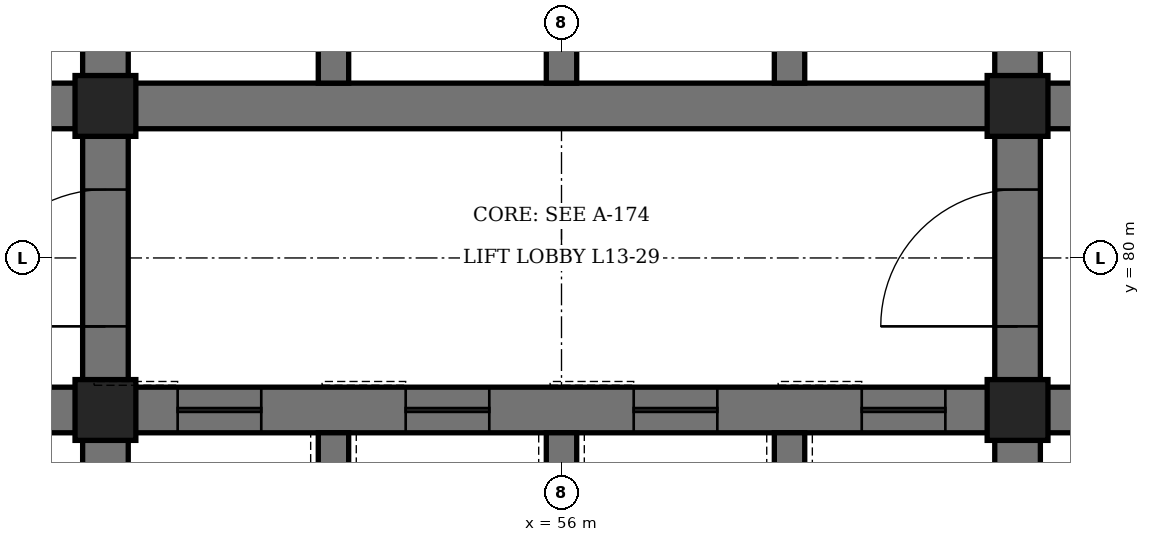
"""IFC4 building model, lengths in metres.
Left out: names, types, materials, properties, quantities, classifications, styles, units other than length and angle.
Written with IfcOpenShell. Run it as: python <this file> out.ifc"""

import sys

from ifc_helpers import new_model, si_unit, direction, frame, frame_2d, origin, origin_2d, place, context, subcontext, project, spatial, rectangle, hollow_rectangle, extrude, element, fill, save


model = new_model("IFC4")
c1 = context("Model", 3, precision=1e-05, world=origin(), true_north=direction((0.0, 1.0)))
c2 = subcontext(c1, "Body", "Model", "MODEL_VIEW")
j1 = project(units=[si_unit("LENGTHUNIT", "METRE"), si_unit("PLANEANGLEUNIT", "RADIAN")], contexts=[c1])
p1 = place(None, origin())
s1 = spatial("IfcSite", under=j1, at=p1, CompositionType="ELEMENT")
p2 = place(p1, origin())
s2 = spatial("IfcBuilding", under=s1, at=p2, CompositionType="ELEMENT")
p3 = place(p2, frame((0.0, 0.0, 64.3)))
s3 = spatial("IfcBuildingStorey", under=s2, at=p3, CompositionType="ELEMENT", Elevation=64.3)
p4 = place(p3, frame((50.0, 71.6, 0.0), z_axis=(0.0, 0.0, 1.0), x_axis=(0.0, 1.0, 0.0)))
e1 = element("IfcWall", 1, at=p4, inside=s3, PredefinedType="SHEAR", context=c2, shape_type="SweptSolid", body=[
    extrude(rectangle(XDim=16.8, YDim=0.6, at=frame_2d((8.4, 0.0))), origin(), (0.0, 0.0, 1.0), 4.2),
])
p5 = place(p4, frame((7.5, 0.0, 0.0)))
e2 = element("IfcOpeningElement", 2, at=p5, cuts=e1, PredefinedType="OPENING", context=c2, shape_type="SweptSolid", body=[
    extrude(rectangle(XDim=1.8, YDim=2.4, at=frame_2d((0.9, 1.2))), frame((0.0, 0.31, 0.0), z_axis=(0.0, -1.0, 0.0), x_axis=(1.0, 0.0, 0.0)), (0.0, 0.0, 1.0), 0.62),
])
p6 = place(p3, frame((62.0, 71.6, 0.0), z_axis=(0.0, 0.0, 1.0), x_axis=(0.0, 1.0, 0.0)))
e3 = element("IfcWall", 3, at=p6, inside=s3, PredefinedType="SHEAR", context=c2, shape_type="SweptSolid", body=[
    extrude(rectangle(XDim=16.8, YDim=0.6, at=frame_2d((8.4, 0.0))), origin(), (0.0, 0.0, 1.0), 4.2),
])
p7 = place(p6, frame((7.5, 0.0, 0.0)))
e4 = element("IfcOpeningElement", 4, at=p7, cuts=e3, PredefinedType="OPENING", context=c2, shape_type="SweptSolid", body=[
    extrude(rectangle(XDim=1.8, YDim=2.4, at=frame_2d((0.9, 1.2))), frame((0.0, 0.31, 0.0), z_axis=(0.0, -1.0, 0.0), x_axis=(1.0, 0.0, 0.0)), (0.0, 0.0, 1.0), 0.62),
])
p8 = place(p3, frame((44.6, 78.0, 0.0), z_axis=(0.0, 0.0, 1.0), x_axis=(1.0, 0.0, 0.0)))
e5 = element("IfcWall", 5, at=p8, inside=s3, PredefinedType="SHEAR", context=c2, shape_type="SweptSolid", body=[
    extrude(rectangle(XDim=5.1, YDim=0.6, at=frame_2d((2.55, 0.0))), origin(), (0.0, 0.0, 1.0), 4.2),
])
p9 = place(p8, frame((1.8, 0.0, 0.0)))
e6 = element("IfcOpeningElement", 6, at=p9, cuts=e5, PredefinedType="OPENING", context=c2, shape_type="SweptSolid", body=[
    extrude(rectangle(XDim=1.2, YDim=2.1, at=frame_2d((0.6, 1.05))), frame((0.0, 0.31, 0.0), z_axis=(0.0, -1.0, 0.0), x_axis=(1.0, 0.0, 0.0)), (0.0, 0.0, 1.0), 0.62),
])
p10 = place(p3, frame((44.6, 82.0, 0.0), z_axis=(0.0, 0.0, 1.0), x_axis=(1.0, 0.0, 0.0)))
e7 = element("IfcWall", 7, at=p10, inside=s3, PredefinedType="SHEAR", context=c2, shape_type="SweptSolid", body=[
    extrude(rectangle(XDim=5.1, YDim=0.6, at=frame_2d((2.55, 0.0))), origin(), (0.0, 0.0, 1.0), 4.2),
])
p11 = place(p10, frame((0.7, 0.0, 0.0)))
e8 = element("IfcOpeningElement", 8, at=p11, cuts=e7, PredefinedType="OPENING", context=c2, shape_type="SweptSolid", body=[
    extrude(rectangle(XDim=0.9, YDim=2.1, at=frame_2d((0.45, 1.05))), frame((0.0, 0.31, 0.0), z_axis=(0.0, -1.0, 0.0), x_axis=(1.0, 0.0, 0.0)), (0.0, 0.0, 1.0), 0.62),
])
p12 = place(p3, frame((62.3, 78.0, 0.0), z_axis=(0.0, 0.0, 1.0), x_axis=(1.0, 0.0, 0.0)))
e9 = element("IfcWall", 9, at=p12, inside=s3, PredefinedType="SHEAR", context=c2, shape_type="SweptSolid", body=[
    extrude(rectangle(XDim=5.1, YDim=0.6, at=frame_2d((2.55, 0.0))), origin(), (0.0, 0.0, 1.0), 4.2),
])
p13 = place(p12, frame((2.1, 0.0, 0.0)))
e10 = element("IfcOpeningElement", 10, at=p13, cuts=e9, PredefinedType="OPENING", context=c2, shape_type="SweptSolid", body=[
    extrude(rectangle(XDim=1.2, YDim=2.1, at=frame_2d((0.6, 1.05))), frame((0.0, 0.31, 0.0), z_axis=(0.0, -1.0, 0.0), x_axis=(1.0, 0.0, 0.0)), (0.0, 0.0, 1.0), 0.62),
])
p14 = place(p3, frame((62.3, 82.0, 0.0), z_axis=(0.0, 0.0, 1.0), x_axis=(1.0, 0.0, 0.0)))
e11 = element("IfcWall", 11, at=p14, inside=s3, PredefinedType="SHEAR", context=c2, shape_type="SweptSolid", body=[
    extrude(rectangle(XDim=5.1, YDim=0.6, at=frame_2d((2.55, 0.0))), origin(), (0.0, 0.0, 1.0), 4.2),
])
p15 = place(p14, frame((2.1, 0.0, 0.0)))
e12 = element("IfcOpeningElement", 12, at=p15, cuts=e11, PredefinedType="OPENING", context=c2, shape_type="SweptSolid", body=[
    extrude(rectangle(XDim=1.2, YDim=2.1, at=frame_2d((0.6, 1.05))), frame((0.0, 0.31, 0.0), z_axis=(0.0, -1.0, 0.0), x_axis=(1.0, 0.0, 0.0)), (0.0, 0.0, 1.0), 0.62),
])
p16 = place(p3, frame((50.3, 78.0, 0.0), z_axis=(0.0, 0.0, 1.0), x_axis=(1.0, 0.0, 0.0)))
e13 = element("IfcWall", 13, at=p16, inside=s3, PredefinedType="SHEAR", context=c2, shape_type="SweptSolid", body=[
    extrude(rectangle(XDim=11.4, YDim=0.6, at=frame_2d((5.7, 0.0))), origin(), (0.0, 0.0, 1.0), 4.2),
])
p17 = place(p16, frame((0.65, 0.0, 0.0)))
e14 = element("IfcOpeningElement", 14, at=p17, cuts=e13, PredefinedType="OPENING", context=c2, shape_type="SweptSolid", body=[
    extrude(rectangle(XDim=1.1, YDim=2.2, at=frame_2d((0.55, 1.1))), frame((0.0, 0.31, 0.0), z_axis=(0.0, -1.0, 0.0), x_axis=(1.0, 0.0, 0.0)), (0.0, 0.0, 1.0), 0.62),
])
p18 = place(p16, frame((3.65, 0.0, 0.0)))
e15 = element("IfcOpeningElement", 15, at=p18, cuts=e13, PredefinedType="OPENING", context=c2, shape_type="SweptSolid", body=[
    extrude(rectangle(XDim=1.1, YDim=2.2, at=frame_2d((0.55, 1.1))), frame((0.0, 0.31, 0.0), z_axis=(0.0, -1.0, 0.0), x_axis=(1.0, 0.0, 0.0)), (0.0, 0.0, 1.0), 0.62),
])
p19 = place(p16, frame((6.65, 0.0, 0.0)))
e16 = element("IfcOpeningElement", 16, at=p19, cuts=e13, PredefinedType="OPENING", context=c2, shape_type="SweptSolid", body=[
    extrude(rectangle(XDim=1.1, YDim=2.2, at=frame_2d((0.55, 1.1))), frame((0.0, 0.31, 0.0), z_axis=(0.0, -1.0, 0.0), x_axis=(1.0, 0.0, 0.0)), (0.0, 0.0, 1.0), 0.62),
])
p20 = place(p16, frame((9.65, 0.0, 0.0)))
e17 = element("IfcOpeningElement", 17, at=p20, cuts=e13, PredefinedType="OPENING", context=c2, shape_type="SweptSolid", body=[
    extrude(rectangle(XDim=1.1, YDim=2.2, at=frame_2d((0.55, 1.1))), frame((0.0, 0.31, 0.0), z_axis=(0.0, -1.0, 0.0), x_axis=(1.0, 0.0, 0.0)), (0.0, 0.0, 1.0), 0.62),
])
p21 = place(p3, frame((50.3, 82.0, 0.0), z_axis=(0.0, 0.0, 1.0), x_axis=(1.0, 0.0, 0.0)))
e18 = element("IfcWall", 18, at=p21, inside=s3, PredefinedType="SHEAR", context=c2, shape_type="SweptSolid", body=[
    extrude(rectangle(XDim=11.4, YDim=0.6, at=frame_2d((5.7, 0.0))), origin(), (0.0, 0.0, 1.0), 4.2),
])
p22 = place(p3, frame((53.0, 74.2, 0.0), z_axis=(0.0, 0.0, 1.0), x_axis=(0.0, 1.0, 0.0)))
e19 = element("IfcWall", 19, at=p22, inside=s3, PredefinedType="SHEAR", context=c2, shape_type="SweptSolid", body=[
    extrude(rectangle(XDim=3.5, YDim=0.4, at=frame_2d((1.75, 0.0))), origin(), (0.0, 0.0, 1.0), 4.2),
])
p23 = place(p3, frame((53.0, 82.3, 0.0), z_axis=(0.0, 0.0, 1.0), x_axis=(0.0, 1.0, 0.0)))
e20 = element("IfcWall", 20, at=p23, inside=s3, PredefinedType="SHEAR", context=c2, shape_type="SweptSolid", body=[
    extrude(rectangle(XDim=3.4, YDim=0.4, at=frame_2d((1.7, 0.0))), origin(), (0.0, 0.0, 1.0), 4.2),
])
p24 = place(p3, frame((56.0, 74.2, 0.0), z_axis=(0.0, 0.0, 1.0), x_axis=(0.0, 1.0, 0.0)))
e21 = element("IfcWall", 21, at=p24, inside=s3, PredefinedType="SHEAR", context=c2, shape_type="SweptSolid", body=[
    extrude(rectangle(XDim=3.5, YDim=0.4, at=frame_2d((1.75, 0.0))), origin(), (0.0, 0.0, 1.0), 4.2),
])
p25 = place(p3, frame((56.0, 82.3, 0.0), z_axis=(0.0, 0.0, 1.0), x_axis=(0.0, 1.0, 0.0)))
e22 = element("IfcWall", 22, at=p25, inside=s3, PredefinedType="SHEAR", context=c2, shape_type="SweptSolid", body=[
    extrude(rectangle(XDim=3.4, YDim=0.4, at=frame_2d((1.7, 0.0))), origin(), (0.0, 0.0, 1.0), 4.2),
])
p26 = place(p3, frame((59.0, 74.2, 0.0), z_axis=(0.0, 0.0, 1.0), x_axis=(0.0, 1.0, 0.0)))
e23 = element("IfcWall", 23, at=p26, inside=s3, PredefinedType="SHEAR", context=c2, shape_type="SweptSolid", body=[
    extrude(rectangle(XDim=3.5, YDim=0.4, at=frame_2d((1.75, 0.0))), origin(), (0.0, 0.0, 1.0), 4.2),
])
p27 = place(p3, frame((59.0, 82.3, 0.0), z_axis=(0.0, 0.0, 1.0), x_axis=(0.0, 1.0, 0.0)))
e24 = element("IfcWall", 24, at=p27, inside=s3, PredefinedType="SHEAR", context=c2, shape_type="SweptSolid", body=[
    extrude(rectangle(XDim=3.4, YDim=0.4, at=frame_2d((1.7, 0.0))), origin(), (0.0, 0.0, 1.0), 4.2),
])
for number, where, z_axis, x_axis in (
    (25, (50.0, 78.0, 0.0), (0.0, 0.0, 1.0), (1.0, 0.0, 0.0)),
    (26, (50.0, 82.0, 0.0), (0.0, 0.0, 1.0), (1.0, 0.0, 0.0)),
    (27, (62.0, 78.0, 0.0), (0.0, 0.0, 1.0), (1.0, 0.0, 0.0)),
    (28, (62.0, 82.0, 0.0), (0.0, 0.0, 1.0), (1.0, 0.0, 0.0)),
):
    element("IfcColumn", number, at=place(p3, frame(where, z_axis=z_axis, x_axis=x_axis)), inside=s3, PredefinedType="COLUMN", context=c2, shape_type="SweptSolid", body=[
        extrude(hollow_rectangle(XDim=0.8, YDim=0.8, WallThickness=0.1, at=origin_2d()), origin(), (0.0, 0.0, 1.0), 4.2),
    ])
p28 = place(p5, origin())
e29 = element("IfcDoor", 29, at=p28, inside=s3, OperationType="DOUBLE_DOOR_SINGLE_SWING", PredefinedType="DOOR", context=c2, shape_type="SweptSolid", body=[
    extrude(rectangle(XDim=1.8, YDim=2.4, at=frame_2d((0.9, 1.2))), frame((0.0, 0.3, 0.0), z_axis=(0.0, -1.0, 0.0), x_axis=(1.0, 0.0, 0.0)), (0.0, 0.0, 1.0), 0.6),
])
fill(e2, e29)
p29 = place(p7, origin())
e30 = element("IfcDoor", 30, at=p29, inside=s3, OperationType="DOUBLE_DOOR_SINGLE_SWING", PredefinedType="DOOR", context=c2, shape_type="SweptSolid", body=[
    extrude(rectangle(XDim=1.8, YDim=2.4, at=frame_2d((0.9, 1.2))), frame((0.0, 0.3, 0.0), z_axis=(0.0, -1.0, 0.0), x_axis=(1.0, 0.0, 0.0)), (0.0, 0.0, 1.0), 0.6),
])
fill(e4, e30)
p30 = place(p17, origin())
e31 = element("IfcDoor", 31, at=p30, inside=s3, OperationType="SLIDING_TO_LEFT", PredefinedType="DOOR", context=c2, shape_type="SweptSolid", body=[
    extrude(rectangle(XDim=1.1, YDim=2.2, at=frame_2d((0.55, 1.1))), frame((0.0, 0.3, 0.0), z_axis=(0.0, -1.0, 0.0), x_axis=(1.0, 0.0, 0.0)), (0.0, 0.0, 1.0), 0.6),
])
fill(e14, e31)
p31 = place(p18, origin())
e32 = element("IfcDoor", 32, at=p31, inside=s3, OperationType="SLIDING_TO_LEFT", PredefinedType="DOOR", context=c2, shape_type="SweptSolid", body=[
    extrude(rectangle(XDim=1.1, YDim=2.2, at=frame_2d((0.55, 1.1))), frame((0.0, 0.3, 0.0), z_axis=(0.0, -1.0, 0.0), x_axis=(1.0, 0.0, 0.0)), (0.0, 0.0, 1.0), 0.6),
])
fill(e15, e32)
p32 = place(p19, origin())
e33 = element("IfcDoor", 33, at=p32, inside=s3, OperationType="SLIDING_TO_LEFT", PredefinedType="DOOR", context=c2, shape_type="SweptSolid", body=[
    extrude(rectangle(XDim=1.1, YDim=2.2, at=frame_2d((0.55, 1.1))), frame((0.0, 0.3, 0.0), z_axis=(0.0, -1.0, 0.0), x_axis=(1.0, 0.0, 0.0)), (0.0, 0.0, 1.0), 0.6),
])
fill(e16, e33)
p33 = place(p20, origin())
e34 = element("IfcDoor", 34, at=p33, inside=s3, OperationType="SLIDING_TO_LEFT", PredefinedType="DOOR", context=c2, shape_type="SweptSolid", body=[
    extrude(rectangle(XDim=1.1, YDim=2.2, at=frame_2d((0.55, 1.1))), frame((0.0, 0.3, 0.0), z_axis=(0.0, -1.0, 0.0), x_axis=(1.0, 0.0, 0.0)), (0.0, 0.0, 1.0), 0.6),
])
fill(e17, e34)
save(model, sys.argv[1])
